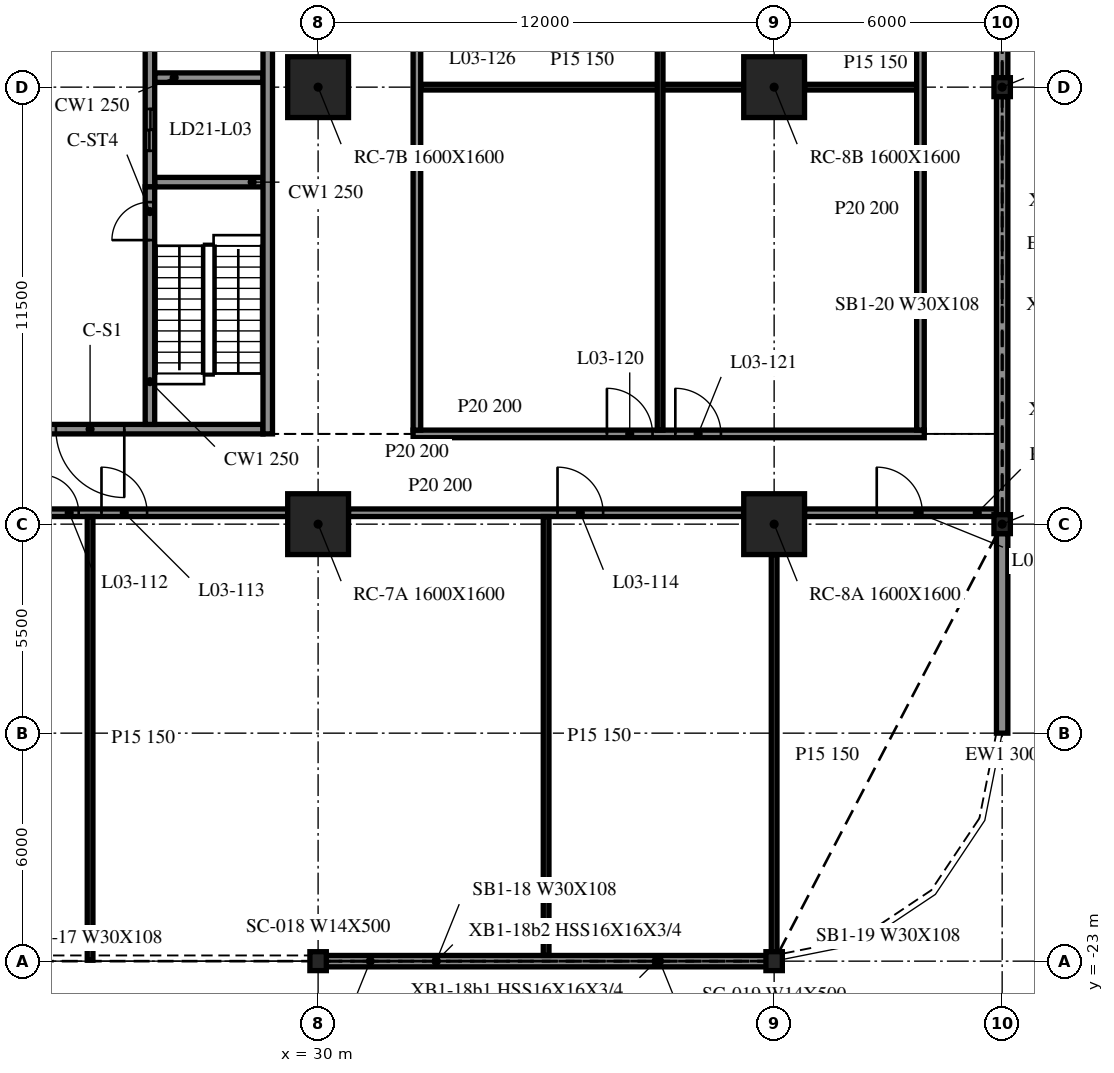
"""IFC4 building model, lengths in metres.
Left out: names, types, materials, properties, quantities, classifications, styles, units other than length and angle.
Written with IfcOpenShell. Run it as: python <this file> out.ifc"""

import sys

from ifc_helpers import new_model, si_unit, direction, frame, frame_2d, origin, origin_2d, place, context, subcontext, project, spatial, rectangle, i_section, extrude, element, fill, save


model = new_model("IFC4")
c1 = context("Model", 3, precision=1e-05, world=origin(), true_north=direction((0.0, 1.0)))
c2 = subcontext(c1, "Body", "Model", "MODEL_VIEW")
j1 = project(units=[si_unit("LENGTHUNIT", "METRE"), si_unit("PLANEANGLEUNIT", "RADIAN")], contexts=[c1])
p1 = place(None, origin())
s1 = spatial("IfcSite", under=j1, at=p1, CompositionType="ELEMENT")
p2 = place(p1, origin())
s2 = spatial("IfcBuilding", under=s1, at=p2, CompositionType="ELEMENT")
p3 = place(p2, frame((0.0, 0.0, 15.8)))
s3 = spatial("IfcBuildingStorey", under=s2, at=p3, CompositionType="ELEMENT", Elevation=15.8)
for number, where, z_axis, x_axis in (
    (1, (30.0, -11.5, -0.34), (0.0, 0.0, 1.0), (1.0, 0.0, 0.0)),
    (2, (30.0, 0.0, -0.34), (0.0, 0.0, 1.0), (1.0, 0.0, 0.0)),
    (3, (42.0, -11.5, -0.34), (0.0, 0.0, 1.0), (1.0, 0.0, 0.0)),
    (4, (42.0, 0.0, -0.34), (0.0, 0.0, 1.0), (1.0, 0.0, 0.0)),
):
    element("IfcColumn", number, at=place(p3, frame(where, z_axis=z_axis, x_axis=x_axis)), inside=s3, PredefinedType="COLUMN", context=c2, shape_type="SweptSolid", body=[
        extrude(rectangle(XDim=1.6, YDim=1.6, at=origin_2d()), origin(), (0.0, 0.0, 1.0), 4.3),
    ])
for number, where, z_axis, x_axis in (
    (5, (30.0, -23.0, -0.34), (0.0, 0.0, 1.0), (1.0, 0.0, 0.0)),
    (6, (42.0, -23.0, -0.34), (0.0, 0.0, 1.0), (1.0, 0.0, 0.0)),
    (7, (48.0, -11.5, -0.34), (0.0, 0.0, 1.0), (1.0, 0.0, 0.0)),
    (8, (48.0, 0.0, -0.34), (0.0, 0.0, 1.0), (1.0, 0.0, 0.0)),
):
    element("IfcColumn", number, at=place(p3, frame(where, z_axis=z_axis, x_axis=x_axis)), inside=s3, PredefinedType="COLUMN", context=c2, shape_type="SweptSolid", body=[
        extrude(i_section(OverallWidth=0.432, OverallDepth=0.498, WebThickness=0.056, FlangeThickness=0.089, at=origin_2d()), origin(), (0.0, 0.0, 1.0), 4.3),
    ])
p4 = place(p3, frame((30.028, -23.0, 0.0), z_axis=(0.0, 0.0, 1.0), x_axis=(1.0, 0.0, 0.0)))
e9 = element("IfcWall", 9, at=p4, inside=s3, PredefinedType="NOTDEFINED", context=c2, shape_type="SweptSolid", body=[
    extrude(rectangle(XDim=11.944, YDim=0.3, at=frame_2d((5.972, 0.0))), origin(), (0.0, 0.0, 1.0), 3.203),
])
p5 = place(p3, frame((48.0, -17.0, 0.0), z_axis=(0.0, 0.0, 1.0), x_axis=(0.0, 1.0, 0.0)))
e10 = element("IfcWall", 10, at=p5, inside=s3, PredefinedType="NOTDEFINED", context=c2, shape_type="SweptSolid", body=[
    extrude(rectangle(XDim=5.251, YDim=0.3, at=frame_2d((2.625, 0.0))), origin(), (0.0, 0.0, 1.0), 3.203),
])
for number, where, z_axis, x_axis in (
    (11, (48.0, -11.251, 0.0), (0.0, 0.0, 1.0), (0.0, 1.0, 0.0)),
    (12, (48.0, 0.249, 0.0), (0.0, 0.0, 1.0), (0.0, 1.0, 0.0)),
):
    element("IfcWall", number, at=place(p3, frame(where, z_axis=z_axis, x_axis=x_axis)), inside=s3, PredefinedType="NOTDEFINED", context=c2, shape_type="SweptSolid", body=[
        extrude(rectangle(XDim=11.002, YDim=0.3, at=frame_2d((5.501, 0.0))), origin(), (0.0, 0.0, 1.0), 3.203),
    ])
p6 = place(p3, frame((28.675, -9.125, 0.0), z_axis=(0.0, 0.0, 1.0), x_axis=(0.0, 1.0, 0.0)))
e13 = element("IfcWall", 13, at=p6, inside=s3, PredefinedType="SOLIDWALL", context=c2, shape_type="SweptSolid", body=[
    extrude(rectangle(XDim=24.25, YDim=0.25, at=frame_2d((12.125, 0.0))), origin(), (0.0, 0.0, 1.0), 3.96),
])
p7 = place(p6, frame((14.425, 0.0, 0.0)))
e14 = element("IfcOpeningElement", 14, at=p7, cuts=e13, PredefinedType="OPENING", context=c2, shape_type="SweptSolid", body=[
    extrude(rectangle(XDim=0.9, YDim=2.1, at=frame_2d((0.45, 1.05))), frame((0.0, 0.135, 0.0), z_axis=(0.0, -1.0, 0.0), x_axis=(1.0, 0.0, 0.0)), (0.0, 0.0, 1.0), 0.27),
])
p8 = place(p6, frame((21.425, 0.0, 0.0)))
e15 = element("IfcOpeningElement", 15, at=p8, cuts=e13, PredefinedType="OPENING", context=c2, shape_type="SweptSolid", body=[
    extrude(rectangle(XDim=0.9, YDim=2.1, at=frame_2d((0.45, 1.05))), frame((0.0, 0.135, 0.0), z_axis=(0.0, -1.0, 0.0), x_axis=(1.0, 0.0, 0.0)), (0.0, 0.0, 1.0), 0.27),
])
p9 = place(p3, frame((28.55, -9.0, 0.0), z_axis=(0.0, 0.0, 1.0), x_axis=(-1.0, 0.0, 0.0)))
e16 = element("IfcWall", 16, at=p9, inside=s3, PredefinedType="SOLIDWALL", context=c2, shape_type="SweptSolid", body=[
    extrude(rectangle(XDim=9.1, YDim=0.25, at=frame_2d((4.55, 0.0))), origin(), (0.0, 0.0, 1.0), 3.96),
])
p10 = place(p9, frame((3.65, 0.0, 0.0)))
e17 = element("IfcOpeningElement", 17, at=p10, cuts=e16, PredefinedType="OPENING", context=c2, shape_type="SweptSolid", body=[
    extrude(rectangle(XDim=1.8, YDim=2.1, at=frame_2d((0.9, 1.05))), frame((0.0, 0.135, 0.0), z_axis=(0.0, -1.0, 0.0), x_axis=(1.0, 0.0, 0.0)), (0.0, 0.0, 1.0), 0.27),
])
p11 = place(p3, frame((25.575, -8.875, 0.0), z_axis=(0.0, 0.0, 1.0), x_axis=(0.0, 1.0, 0.0)))
e18 = element("IfcWall", 18, at=p11, inside=s3, PredefinedType="SOLIDWALL", context=c2, shape_type="SweptSolid", body=[
    extrude(rectangle(XDim=6.25, YDim=0.25, at=frame_2d((3.125, 0.0))), origin(), (0.0, 0.0, 1.0), 3.96),
])
p12 = place(p11, frame((4.85, 0.0, 0.0)))
e19 = element("IfcOpeningElement", 19, at=p12, cuts=e18, PredefinedType="OPENING", context=c2, shape_type="SweptSolid", body=[
    extrude(rectangle(XDim=1.0, YDim=2.1, at=frame_2d((0.5, 1.05))), frame((0.0, 0.135, 0.0), z_axis=(0.0, -1.0, 0.0), x_axis=(1.0, 0.0, 0.0)), (0.0, 0.0, 1.0), 0.27),
])
p13 = place(p3, frame((25.575, 14.875, 0.0), z_axis=(0.0, 0.0, 1.0), x_axis=(0.0, -1.0, 0.0)))
e20 = element("IfcWall", 20, at=p13, inside=s3, PredefinedType="SOLIDWALL", context=c2, shape_type="SweptSolid", body=[
    extrude(rectangle(XDim=17.5, YDim=0.25, at=frame_2d((8.75, 0.0))), origin(), (0.0, 0.0, 1.0), 3.96),
])
p14 = place(p13, frame((15.45, 0.0, 0.0)))
e21 = element("IfcOpeningElement", 21, at=p14, cuts=e20, PredefinedType="OPENING", context=c2, shape_type="SweptSolid", body=[
    extrude(rectangle(XDim=1.1, YDim=2.1, at=frame_2d((0.55, 1.05))), frame((0.0, 0.135, 0.0), z_axis=(0.0, -1.0, 0.0), x_axis=(1.0, 0.0, 0.0)), (0.0, 0.0, 1.0), 0.27),
])
p15 = place(p13, frame((12.8, 0.0, 0.0)))
e22 = element("IfcOpeningElement", 22, at=p15, cuts=e20, PredefinedType="OPENING", context=c2, shape_type="SweptSolid", body=[
    extrude(rectangle(XDim=0.9, YDim=2.1, at=frame_2d((0.45, 1.05))), frame((0.0, 0.135, 0.0), z_axis=(0.0, -1.0, 0.0), x_axis=(1.0, 0.0, 0.0)), (0.0, 0.0, 1.0), 0.27),
])
for number, where, z_axis, x_axis in (
    (23, (25.7, -2.5, 0.0), (0.0, 0.0, 1.0), (1.0, 0.0, 0.0)),
    (24, (25.7, 0.25, 0.0), (0.0, 0.0, 1.0), (1.0, 0.0, 0.0)),
):
    element("IfcWall", number, at=place(p3, frame(where, z_axis=z_axis, x_axis=x_axis)), inside=s3, PredefinedType="SOLIDWALL", context=c2, shape_type="SweptSolid", body=[
        extrude(rectangle(XDim=2.85, YDim=0.25, at=frame_2d((1.425, 0.0))), origin(), (0.0, 0.0, 1.0), 3.96),
    ])
p16 = place(p3, frame((18.8, -11.2, 0.0), z_axis=(0.0, 0.0, 1.0), x_axis=(1.0, 0.0, 0.0)))
e25 = element("IfcWall", 25, at=p16, inside=s3, PredefinedType="PARTITIONING", context=c2, shape_type="SweptSolid", body=[
    extrude(rectangle(XDim=10.4, YDim=0.2, at=frame_2d((5.2, 0.0))), origin(), (0.0, 0.0, 1.0), 3.96),
])
p17 = place(p16, frame((3.9, 0.0, 0.0)))
e26 = element("IfcOpeningElement", 26, at=p17, cuts=e25, PredefinedType="OPENING", context=c2, shape_type="SweptSolid", body=[
    extrude(rectangle(XDim=1.0, YDim=2.1, at=frame_2d((0.5, 1.05))), frame((0.0, 0.11, 0.0), z_axis=(0.0, -1.0, 0.0), x_axis=(1.0, 0.0, 0.0)), (0.0, 0.0, 1.0), 0.22),
])
p18 = place(p16, frame((5.5, 0.0, 0.0)))
e27 = element("IfcOpeningElement", 27, at=p18, cuts=e25, PredefinedType="OPENING", context=c2, shape_type="SweptSolid", body=[
    extrude(rectangle(XDim=1.2, YDim=2.1, at=frame_2d((0.6, 1.05))), frame((0.0, 0.11, 0.0), z_axis=(0.0, -1.0, 0.0), x_axis=(1.0, 0.0, 0.0)), (0.0, 0.0, 1.0), 0.22),
])
p19 = place(p3, frame((30.8, -11.2, 0.0), z_axis=(0.0, 0.0, 1.0), x_axis=(1.0, 0.0, 0.0)))
e28 = element("IfcWall", 28, at=p19, inside=s3, PredefinedType="PARTITIONING", context=c2, shape_type="SweptSolid", body=[
    extrude(rectangle(XDim=10.4, YDim=0.2, at=frame_2d((5.2, 0.0))), origin(), (0.0, 0.0, 1.0), 3.96),
])
p20 = place(p19, frame((5.5, 0.0, 0.0)))
e29 = element("IfcOpeningElement", 29, at=p20, cuts=e28, PredefinedType="OPENING", context=c2, shape_type="SweptSolid", body=[
    extrude(rectangle(XDim=1.2, YDim=2.1, at=frame_2d((0.6, 1.05))), frame((0.0, 0.11, 0.0), z_axis=(0.0, -1.0, 0.0), x_axis=(1.0, 0.0, 0.0)), (0.0, 0.0, 1.0), 0.22),
])
p21 = place(p3, frame((42.8, -11.2, 0.0), z_axis=(0.0, 0.0, 1.0), x_axis=(1.0, 0.0, 0.0)))
e30 = element("IfcWall", 30, at=p21, inside=s3, PredefinedType="PARTITIONING", context=c2, shape_type="SweptSolid", body=[
    extrude(rectangle(XDim=5.05, YDim=0.2, at=frame_2d((2.525, 0.0))), origin(), (0.0, 0.0, 1.0), 3.96),
])
p22 = place(p21, frame((1.9, 0.0, 0.0)))
e31 = element("IfcOpeningElement", 31, at=p22, cuts=e30, PredefinedType="OPENING", context=c2, shape_type="SweptSolid", body=[
    extrude(rectangle(XDim=1.2, YDim=2.1, at=frame_2d((0.6, 1.05))), frame((0.0, 0.11, 0.0), z_axis=(0.0, -1.0, 0.0), x_axis=(1.0, 0.0, 0.0)), (0.0, 0.0, 1.0), 0.22),
])
p23 = place(p3, frame((32.5, -9.125, 0.0), z_axis=(0.0, 0.0, 1.0), x_axis=(1.0, 0.0, 0.0)))
e32 = element("IfcWall", 32, at=p23, inside=s3, PredefinedType="PARTITIONING", context=c2, shape_type="SweptSolid", body=[
    extrude(rectangle(XDim=13.45, YDim=0.2, at=frame_2d((6.725, 0.0))), origin(), (0.0, 0.0, 1.0), 3.96),
])
p24 = place(p23, frame((5.1, 0.0, 0.0)))
e33 = element("IfcOpeningElement", 33, at=p24, cuts=e32, PredefinedType="OPENING", context=c2, shape_type="SweptSolid", body=[
    extrude(rectangle(XDim=1.2, YDim=2.1, at=frame_2d((0.6, 1.05))), frame((0.0, 0.11, 0.0), z_axis=(0.0, -1.0, 0.0), x_axis=(1.0, 0.0, 0.0)), (0.0, 0.0, 1.0), 0.22),
])
p25 = place(p23, frame((6.9, 0.0, 0.0)))
e34 = element("IfcOpeningElement", 34, at=p25, cuts=e32, PredefinedType="OPENING", context=c2, shape_type="SweptSolid", body=[
    extrude(rectangle(XDim=1.2, YDim=2.1, at=frame_2d((0.6, 1.05))), frame((0.0, 0.11, 0.0), z_axis=(0.0, -1.0, 0.0), x_axis=(1.0, 0.0, 0.0)), (0.0, 0.0, 1.0), 0.22),
])
p26 = place(p3, frame((32.7, 0.0, 0.0), z_axis=(0.0, 0.0, 1.0), x_axis=(1.0, 0.0, 0.0)))
e35 = element("IfcWall", 35, at=p26, inside=s3, PredefinedType="PARTITIONING", context=c2, shape_type="SweptSolid", body=[
    extrude(rectangle(XDim=8.5, YDim=0.15, at=frame_2d((4.25, 0.0))), origin(), (0.0, 0.0, 1.0), 3.96),
])
p27 = place(p3, frame((42.8, 0.0, 0.0), z_axis=(0.0, 0.0, 1.0), x_axis=(1.0, 0.0, 0.0)))
e36 = element("IfcWall", 36, at=p27, inside=s3, PredefinedType="PARTITIONING", context=c2, shape_type="SweptSolid", body=[
    extrude(rectangle(XDim=2.95, YDim=0.15, at=frame_2d((1.475, 0.0))), origin(), (0.0, 0.0, 1.0), 3.96),
])
p28 = place(p3, frame((24.0, -22.975, 0.0), z_axis=(0.0, 0.0, 1.0), x_axis=(0.0, 1.0, 0.0)))
e37 = element("IfcWall", 37, at=p28, inside=s3, PredefinedType="PARTITIONING", context=c2, shape_type="SweptSolid", body=[
    extrude(rectangle(XDim=11.675, YDim=0.15, at=frame_2d((5.837, 0.0))), origin(), (0.0, 0.0, 1.0), 3.96),
])
p29 = place(p3, frame((32.6, -9.025, 0.0), z_axis=(0.0, 0.0, 1.0), x_axis=(0.0, 1.0, 0.0)))
e38 = element("IfcWall", 38, at=p29, inside=s3, PredefinedType="PARTITIONING", context=c2, shape_type="SweptSolid", body=[
    extrude(rectangle(XDim=24.05, YDim=0.2, at=frame_2d((12.025, 0.0))), origin(), (0.0, 0.0, 1.0), 3.96),
])
p30 = place(p29, frame((11.5, 0.0, 0.0)))
e39 = element("IfcOpeningElement", 39, at=p30, cuts=e38, PredefinedType="OPENING", context=c2, shape_type="SweptSolid", body=[
    extrude(rectangle(XDim=1.2, YDim=2.1, at=frame_2d((0.6, 1.05))), frame((0.0, 0.11, 0.0), z_axis=(0.0, -1.0, 0.0), x_axis=(1.0, 0.0, 0.0)), (0.0, 0.0, 1.0), 0.22),
])
p31 = place(p3, frame((36.0, -22.85, 0.0), z_axis=(0.0, 0.0, 1.0), x_axis=(0.0, 1.0, 0.0)))
e40 = element("IfcWall", 40, at=p31, inside=s3, PredefinedType="PARTITIONING", context=c2, shape_type="SweptSolid", body=[
    extrude(rectangle(XDim=11.55, YDim=0.15, at=frame_2d((5.775, 0.0))), origin(), (0.0, 0.0, 1.0), 3.96),
])
p32 = place(p3, frame((39.0, -9.025, 0.0), z_axis=(0.0, 0.0, 1.0), x_axis=(0.0, 1.0, 0.0)))
e41 = element("IfcWall", 41, at=p32, inside=s3, PredefinedType="PARTITIONING", context=c2, shape_type="SweptSolid", body=[
    extrude(rectangle(XDim=24.05, YDim=0.15, at=frame_2d((12.025, 0.0))), origin(), (0.0, 0.0, 1.0), 3.96),
])
p33 = place(p3, frame((42.0, -22.847, 0.0), z_axis=(0.0, 0.0, 1.0), x_axis=(0.0, 1.0, 0.0)))
e42 = element("IfcWall", 42, at=p33, inside=s3, PredefinedType="PARTITIONING", context=c2, shape_type="SweptSolid", body=[
    extrude(rectangle(XDim=10.547, YDim=0.15, at=frame_2d((5.273, 0.0))), origin(), (0.0, 0.0, 1.0), 3.96),
])
p34 = place(p3, frame((45.85, -9.025, 0.0), z_axis=(0.0, 0.0, 1.0), x_axis=(0.0, 1.0, 0.0)))
e43 = element("IfcWall", 43, at=p34, inside=s3, PredefinedType="PARTITIONING", context=c2, shape_type="SweptSolid", body=[
    extrude(rectangle(XDim=24.05, YDim=0.2, at=frame_2d((12.025, 0.0))), origin(), (0.0, 0.0, 1.0), 3.96),
])
p35 = place(p34, frame((11.5, 0.0, 0.0)))
e44 = element("IfcOpeningElement", 44, at=p35, cuts=e43, PredefinedType="OPENING", context=c2, shape_type="SweptSolid", body=[
    extrude(rectangle(XDim=1.2, YDim=2.1, at=frame_2d((0.6, 1.05))), frame((0.0, 0.11, 0.0), z_axis=(0.0, -1.0, 0.0), x_axis=(1.0, 0.0, 0.0)), (0.0, 0.0, 1.0), 0.22),
])
p36 = place(p10, origin())
e45 = element("IfcDoor", 45, at=p36, inside=s3, OperationType="DOUBLE_DOOR_SINGLE_SWING", PredefinedType="DOOR", context=c2, shape_type="SweptSolid", body=[
    extrude(rectangle(XDim=1.8, YDim=2.1, at=frame_2d((0.9, 1.05))), frame((0.0, 0.025, 0.0), z_axis=(0.0, -1.0, 0.0), x_axis=(1.0, 0.0, 0.0)), (0.0, 0.0, 1.0), 0.05),
])
fill(e17, e45)
p37 = place(p14, origin())
e46 = element("IfcDoor", 46, at=p37, inside=s3, OperationType="DOUBLE_DOOR_SLIDING", PredefinedType="DOOR", context=c2, shape_type="SweptSolid", body=[
    extrude(rectangle(XDim=1.1, YDim=2.1, at=frame_2d((0.55, 1.05))), frame((0.0, 0.025, 0.0), z_axis=(0.0, -1.0, 0.0), x_axis=(1.0, 0.0, 0.0)), (0.0, 0.0, 1.0), 0.05),
])
fill(e21, e46)
p38 = place(p12, origin())
e47 = element("IfcDoor", 47, at=p38, inside=s3, OperationType="SINGLE_SWING_LEFT", PredefinedType="DOOR", context=c2, shape_type="SweptSolid", body=[
    extrude(rectangle(XDim=1.0, YDim=2.1, at=frame_2d((0.5, 1.05))), frame((0.0, 0.025, 0.0), z_axis=(0.0, -1.0, 0.0), x_axis=(1.0, 0.0, 0.0)), (0.0, 0.0, 1.0), 0.05),
])
fill(e19, e47)
p39 = place(p17, origin())
e48 = element("IfcDoor", 48, at=p39, inside=s3, OperationType="SINGLE_SWING_RIGHT", PredefinedType="DOOR", context=c2, shape_type="SweptSolid", body=[
    extrude(rectangle(XDim=1.0, YDim=2.1, at=frame_2d((0.5, 1.05))), frame((0.0, 0.025, 0.0), z_axis=(0.0, -1.0, 0.0), x_axis=(1.0, 0.0, 0.0)), (0.0, 0.0, 1.0), 0.05),
])
fill(e26, e48)
p40 = place(p18, origin())
e49 = element("IfcDoor", 49, at=p40, inside=s3, OperationType="SINGLE_SWING_LEFT", PredefinedType="DOOR", context=c2, shape_type="SweptSolid", body=[
    extrude(rectangle(XDim=1.2, YDim=2.1, at=frame_2d((0.6, 1.05))), frame((0.0, 0.025, 0.0), z_axis=(0.0, -1.0, 0.0), x_axis=(1.0, 0.0, 0.0)), (0.0, 0.0, 1.0), 0.05),
])
fill(e27, e49)
p41 = place(p20, origin())
e50 = element("IfcDoor", 50, at=p41, inside=s3, OperationType="SINGLE_SWING_LEFT", PredefinedType="DOOR", context=c2, shape_type="SweptSolid", body=[
    extrude(rectangle(XDim=1.2, YDim=2.1, at=frame_2d((0.6, 1.05))), frame((0.0, 0.025, 0.0), z_axis=(0.0, -1.0, 0.0), x_axis=(1.0, 0.0, 0.0)), (0.0, 0.0, 1.0), 0.05),
])
fill(e29, e50)
p42 = place(p22, origin())
e51 = element("IfcDoor", 51, at=p42, inside=s3, OperationType="SINGLE_SWING_RIGHT", PredefinedType="DOOR", context=c2, shape_type="SweptSolid", body=[
    extrude(rectangle(XDim=1.2, YDim=2.1, at=frame_2d((0.6, 1.05))), frame((0.0, 0.025, 0.0), z_axis=(0.0, -1.0, 0.0), x_axis=(1.0, 0.0, 0.0)), (0.0, 0.0, 1.0), 0.05),
])
fill(e31, e51)
p43 = place(p24, origin())
e52 = element("IfcDoor", 52, at=p43, inside=s3, OperationType="SINGLE_SWING_LEFT", PredefinedType="DOOR", context=c2, shape_type="SweptSolid", body=[
    extrude(rectangle(XDim=1.2, YDim=2.1, at=frame_2d((0.6, 1.05))), frame((0.0, 0.025, 0.0), z_axis=(0.0, -1.0, 0.0), x_axis=(1.0, 0.0, 0.0)), (0.0, 0.0, 1.0), 0.05),
])
fill(e33, e52)
p44 = place(p25, origin())
e53 = element("IfcDoor", 53, at=p44, inside=s3, OperationType="SINGLE_SWING_RIGHT", PredefinedType="DOOR", context=c2, shape_type="SweptSolid", body=[
    extrude(rectangle(XDim=1.2, YDim=2.1, at=frame_2d((0.6, 1.05))), frame((0.0, 0.025, 0.0), z_axis=(0.0, -1.0, 0.0), x_axis=(1.0, 0.0, 0.0)), (0.0, 0.0, 1.0), 0.05),
])
fill(e34, e53)
save(model, sys.argv[1])
